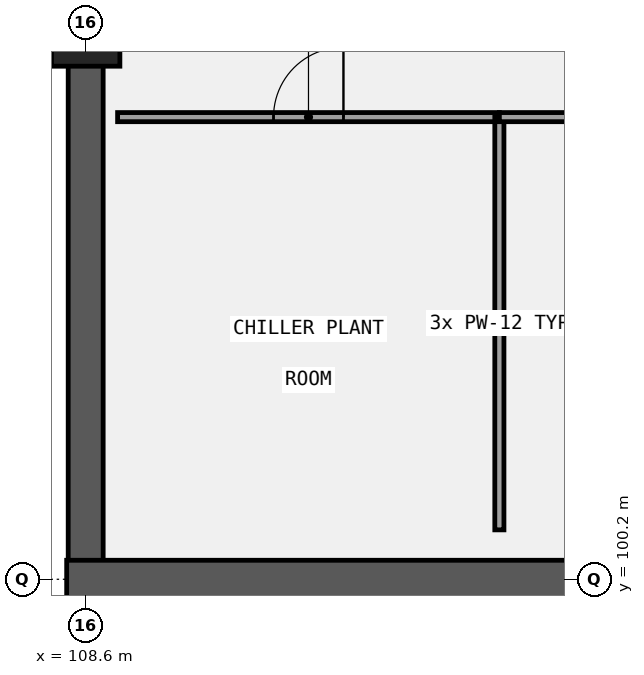
"""IFC4 building model, lengths in metres.
Left out: names, types, materials, properties, quantities, classifications, styles, units other than length and angle.
Written with IfcOpenShell. Run it as: python <this file> out.ifc"""

import sys

from ifc_helpers import new_model, si_unit, direction, frame, frame_2d, origin, origin_2d, place, context, subcontext, project, spatial, rectangle, extrude, element, fill, save


model = new_model("IFC4")
c1 = context("Model", 3, precision=1e-05, world=origin(), true_north=direction((0.0, 1.0)))
c2 = subcontext(c1, "Body", "Model", "MODEL_VIEW")
j1 = project(units=[si_unit("LENGTHUNIT", "METRE"), si_unit("PLANEANGLEUNIT", "RADIAN")], contexts=[c1])
p1 = place(None, origin())
s1 = spatial("IfcSite", under=j1, at=p1, CompositionType="ELEMENT")
p2 = place(p1, origin())
s2 = spatial("IfcBuilding", under=s1, at=p2, CompositionType="ELEMENT")
p3 = place(p2, frame((0.0, 0.0, -8.4)))
s3 = spatial("IfcBuildingStorey", under=s2, at=p3, CompositionType="ELEMENT", Elevation=-8.4)
p4 = place(p3, frame((108.6, 100.43, 0.0), z_axis=(0.0, 0.0, 1.0), x_axis=(0.0, 1.0, 0.0)))
e1 = element("IfcWall", 1, at=p4, inside=s3, PredefinedType="USERDEFINED", context=c2, shape_type="SweptSolid", body=[
    extrude(rectangle(XDim=13.35, YDim=0.46, at=frame_2d((6.675, 0.0))), origin(), (0.0, 0.0, 1.0), 3.05),
])
p5 = place(p3, frame((108.35, 100.2, 0.0), z_axis=(0.0, 0.0, 1.0), x_axis=(1.0, 0.0, 0.0)))
e2 = element("IfcWall", 2, at=p5, inside=s3, PredefinedType="SHEAR", context=c2, shape_type="SweptSolid", body=[
    extrude(rectangle(XDim=14.9, YDim=0.5, at=frame_2d((7.45, 0.0))), origin(), (0.0, 0.0, 1.0), 4.2),
])
p6 = place(p3, frame((108.6, 107.4, 0.0), z_axis=(0.0, 0.0, 1.0), x_axis=(1.0, 0.0, 0.0)))
e3 = element("IfcColumn", 3, at=p6, inside=s3, PredefinedType="COLUMN", context=c2, shape_type="SweptSolid", body=[
    extrude(rectangle(XDim=0.9, YDim=0.9, at=origin_2d()), origin(), (0.0, 0.0, 1.0), 4.2),
])
p7 = place(p3, frame((109.02, 106.28, 0.0), z_axis=(0.0, 0.0, 1.0), x_axis=(1.0, 0.0, 0.0)))
e4 = element("IfcWall", 4, at=p7, inside=s3, PredefinedType="PARTITIONING", context=c2, shape_type="SweptSolid", body=[
    extrude(rectangle(XDim=5.023, YDim=0.12, at=frame_2d((2.511, 0.0))), origin(), (0.0, 0.0, 1.0), 3.9),
])
p8 = place(p7, frame((2.052, 0.0, 0.0)))
e5 = element("IfcOpeningElement", 5, at=p8, cuts=e4, PredefinedType="OPENING", context=c2, shape_type="SweptSolid", body=[
    extrude(rectangle(XDim=0.92, YDim=2.1, at=frame_2d((0.46, 1.05))), frame((0.0, 0.07, 0.0), z_axis=(0.0, -1.0, 0.0), x_axis=(1.0, 0.0, 0.0)), (0.0, 0.0, 1.0), 0.14),
])
p9 = place(p3, frame((114.043, 100.85, 0.0), z_axis=(0.0, 0.0, 1.0), x_axis=(0.0, 1.0, 0.0)))
e6 = element("IfcWall", 6, at=p9, inside=s3, PredefinedType="PARTITIONING", context=c2, shape_type="SweptSolid", body=[
    extrude(rectangle(XDim=5.43, YDim=0.12, at=frame_2d((2.715, 0.0))), origin(), (0.0, 0.0, 1.0), 3.9),
])
p10 = place(p3, frame((114.043, 106.28, 0.0), z_axis=(0.0, 0.0, 1.0), x_axis=(1.0, 0.0, 0.0)))
e7 = element("IfcWall", 7, at=p10, inside=s3, PredefinedType="PARTITIONING", context=c2, shape_type="SweptSolid", body=[
    extrude(rectangle(XDim=5.023, YDim=0.12, at=frame_2d((2.511, 0.0))), origin(), (0.0, 0.0, 1.0), 3.9),
])
p11 = place(p10, frame((3.307, 0.0, 0.0)))
e8 = element("IfcOpeningElement", 8, at=p11, cuts=e7, PredefinedType="OPENING", context=c2, shape_type="SweptSolid", body=[
    extrude(rectangle(XDim=0.92, YDim=2.22, at=frame_2d((0.46, 1.11))), frame((0.0, 0.07, 0.0), z_axis=(0.0, -1.0, 0.0), x_axis=(1.0, 0.0, 0.0)), (0.0, 0.0, 1.0), 0.14),
])
p12 = place(p8, frame((0.92, 0.0, 0.0), z_axis=(0.0, 0.0, 1.0), x_axis=(-1.0, 0.0, 0.0)))
e9 = element("IfcDoor", 9, at=p12, inside=s3, OperationType="SINGLE_SWING_RIGHT", PredefinedType="DOOR", context=c2, shape_type="SweptSolid", body=[
    extrude(rectangle(XDim=0.92, YDim=2.1, at=frame_2d((0.46, 1.05))), frame((0.0, 0.025, 0.0), z_axis=(0.0, -1.0, 0.0), x_axis=(1.0, 0.0, 0.0)), (0.0, 0.0, 1.0), 0.05),
])
fill(e5, e9)
save(model, sys.argv[1])
